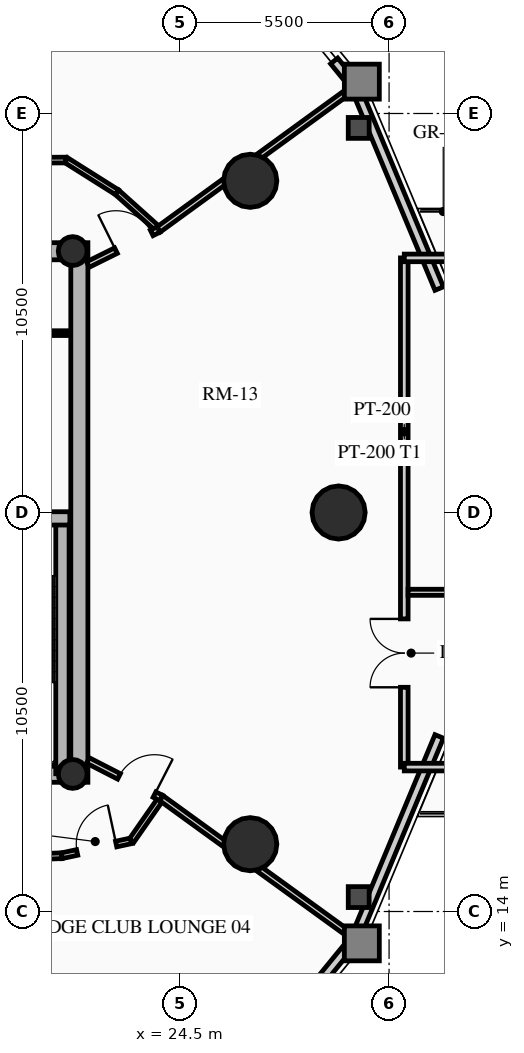
"""IFC4 building model, lengths in metres.
Left out: names, types, materials, properties, quantities, classifications, styles, units other than length and angle.
Written with IfcOpenShell. Run it as: python <this file> out.ifc"""

import sys

from ifc_helpers import new_model, si_unit, direction, frame, frame_2d, origin, origin_2d, place, context, subcontext, project, spatial, rectangle, circle, hollow_circle, extrude, source, transform, mapped, element, fill, save


model = new_model("IFC4")
c1 = context("Model", 3, precision=1e-05, world=origin(), true_north=direction((0.0, 1.0)))
c2 = subcontext(c1, "Body", "Model", "MODEL_VIEW")
j1 = project(units=[si_unit("LENGTHUNIT", "METRE"), si_unit("PLANEANGLEUNIT", "RADIAN")], contexts=[c1])
p1 = place(None, origin())
s1 = spatial("IfcSite", under=j1, at=p1, CompositionType="ELEMENT")
p2 = place(p1, origin())
s2 = spatial("IfcBuilding", under=s1, at=p2, CompositionType="ELEMENT")
p3 = place(p2, frame((0.0, 0.0, 140.32)))
s3 = spatial("IfcBuildingStorey", under=s2, at=p3, CompositionType="ELEMENT", Elevation=140.32)
p4 = place(p3, frame((21.85, 17.4, 0.0), z_axis=(0.0, 0.0, 1.0), x_axis=(0.0, 1.0, 0.0)))
e1 = element("IfcWall", 1, at=p4, inside=s3, PredefinedType="SHEAR", context=c2, shape_type="SweptSolid", body=[
    extrude(rectangle(XDim=14.2, YDim=0.45, at=frame_2d((7.1, 0.0))), origin(), (0.0, 0.0, 1.0), 3.72),
])
p5 = place(p3, frame((11.15, 17.625, 0.0), z_axis=(0.0, 0.0, 1.0), x_axis=(1.0, 0.0, 0.0)))
e2 = element("IfcWall", 2, at=p5, inside=s3, PredefinedType="SHEAR", context=c2, shape_type="SweptSolid", body=[
    extrude(rectangle(XDim=10.7, YDim=0.45, at=frame_2d((5.35, 0.0))), origin(), (0.0, 0.0, 1.0), 3.72),
])
m1 = source(origin(), c2, "Body", "SweptSolid", [
    extrude(rectangle(XDim=1.5, YDim=2.02, at=frame_2d((0.75, 1.01))), frame((0.0, 0.235, 0.0), z_axis=(0.0, -1.0, 0.0), x_axis=(1.0, 0.0, 0.0)), (0.0, 0.0, 1.0), 0.47),
])
p6 = place(p5, frame((5.45, 0.0, 0.0)))
e3 = element("IfcOpeningElement", 3, at=p6, cuts=e2, PredefinedType="OPENING", context=c2, shape_type="MappedRepresentation", body=[
    mapped(m1, transform((0.0, 0.0, 0.0), x_axis=(1.0, 0.0, 0.0), y_axis=(0.0, 1.0, 0.0), z_axis=(0.0, 0.0, 1.0), scale=1.0)),
])
p7 = place(p3, frame((11.15, 31.375, 0.0), z_axis=(0.0, 0.0, 1.0), x_axis=(1.0, 0.0, 0.0)))
e4 = element("IfcWall", 4, at=p7, inside=s3, PredefinedType="SHEAR", context=c2, shape_type="SweptSolid", body=[
    extrude(rectangle(XDim=10.7, YDim=0.45, at=frame_2d((5.35, 0.0))), origin(), (0.0, 0.0, 1.0), 3.72),
])
p8 = place(p7, frame((4.6, 0.0, 0.0)))
e5 = element("IfcOpeningElement", 5, at=p8, cuts=e4, PredefinedType="OPENING", context=c2, shape_type="MappedRepresentation", body=[
    mapped(m1, transform((0.0, 0.0, 0.0), x_axis=(1.0, 0.0, 0.0), y_axis=(0.0, 1.0, 0.0), z_axis=(0.0, 0.0, 1.0), scale=1.0)),
])
p9 = place(p3, frame((21.405, 17.625, 0.0), z_axis=(0.0, 0.0, 1.0), x_axis=(0.0, 1.0, 0.0)))
e6 = element("IfcWall", 6, at=p9, inside=s3, PredefinedType="SHEAR", context=c2, shape_type="SweptSolid", body=[
    extrude(rectangle(XDim=6.72, YDim=0.35, at=frame_2d((3.36, 0.0))), origin(), (0.0, 0.0, 1.0), 3.72),
])
p10 = place(p3, frame((18.315, 24.345, 0.0), z_axis=(0.0, 0.0, 1.0), x_axis=(1.0, 0.0, 0.0)))
e7 = element("IfcWall", 7, at=p10, inside=s3, PredefinedType="SHEAR", context=c2, shape_type="SweptSolid", body=[
    extrude(rectangle(XDim=3.285, YDim=0.35, at=frame_2d((1.643, 0.0))), origin(), (0.0, 0.0, 1.0), 3.72),
])
for number, where, z_axis, x_axis in (
    (8, (21.675, 17.62, 0.0), (0.0, 0.0, 1.0), (1.0, 0.0, 0.0)),
    (9, (21.675, 31.38, 0.0), (0.0, 0.0, 1.0), (1.0, 0.0, 0.0)),
):
    element("IfcColumn", number, at=place(p3, frame(where, z_axis=z_axis, x_axis=x_axis)), inside=s3, PredefinedType="COLUMN", context=c2, shape_type="SweptSolid", body=[
        extrude(hollow_circle(Radius=0.38, WallThickness=0.032, at=origin_2d()), origin(), (0.0, 0.0, 1.0), 3.72),
    ])
for number, where, z_axis, x_axis in (
    (10, (28.672, 24.5, 0.0), (0.0, 0.0, 1.0), (1.0, 0.0, 0.0)),
    (11, (26.347, 33.229, 0.0), (0.0, 0.0, 1.0), (1.0, 0.0, 0.0)),
    (12, (26.347, 15.771, 0.0), (0.0, 0.0, 1.0), (1.0, 0.0, 0.0)),
):
    element("IfcColumn", number, at=place(p3, frame(where, z_axis=z_axis, x_axis=x_axis)), inside=s3, PredefinedType="USERDEFINED", context=c2, shape_type="SweptSolid", body=[
        extrude(circle(Radius=0.7, at=origin_2d()), origin(), (0.0, 0.0, 1.0), 3.72),
    ])
p11 = place(p3, frame((29.105, 35.709, 0.0), z_axis=(0.0, 0.0, 1.0), x_axis=(0.384344417632, -0.923189779317, 0.0)))
e13 = element("IfcWall", 13, at=p11, inside=s3, PredefinedType="SOLIDWALL", context=c2, shape_type="SweptSolid", body=[
    extrude(rectangle(XDim=5.758, YDim=0.24, at=frame_2d((2.879, 0.0))), origin(), (0.0, 0.0, 1.0), 3.465),
])
p12 = place(p3, frame((28.555, 36.383, 0.0), z_axis=(0.0, 0.0, 1.0), x_axis=(0.632702874536, -0.774394649099, 0.0)))
e14 = element("IfcWall", 14, at=p12, inside=s3, PredefinedType="SOLIDWALL", context=c2, shape_type="SweptSolid", body=[
    extrude(rectangle(XDim=0.87, YDim=0.24, at=frame_2d((0.435, 0.0))), origin(), (0.0, 0.0, 1.0), 3.465),
])
p13 = place(p3, frame((29.105, 13.291, 0.0), z_axis=(0.0, 0.0, 1.0), x_axis=(-0.632700781152, -0.77439635945, 0.0)))
e15 = element("IfcWall", 15, at=p13, inside=s3, PredefinedType="SOLIDWALL", context=c2, shape_type="SweptSolid", body=[
    extrude(rectangle(XDim=5.448, YDim=0.24, at=frame_2d((2.724, 0.0))), origin(), (0.0, 0.0, 1.0), 3.465),
])
m2 = source(origin(), c2, "Body", "SweptSolid", [
    extrude(rectangle(XDim=1.9, YDim=1.35, at=frame_2d((0.95, 0.675))), frame((0.0, 0.13, 0.0), z_axis=(0.0, -1.0, 0.0), x_axis=(1.0, 0.0, 0.0)), (0.0, 0.0, 1.0), 0.26),
])
p14 = place(p13, frame((1.774, 0.0, 0.65)))
e16 = element("IfcOpeningElement", 16, at=p14, cuts=e15, PredefinedType="OPENING", context=c2, shape_type="MappedRepresentation", body=[
    mapped(m2, transform((0.0, 0.0, 0.0), x_axis=(1.0, 0.0, 0.0), y_axis=(0.0, 1.0, 0.0), z_axis=(0.0, 0.0, 1.0), scale=1.0)),
])
p15 = place(p3, frame((31.318, 18.607, 0.0), z_axis=(0.0, 0.0, 1.0), x_axis=(-0.384344417632, -0.923189779317, 0.0)))
e17 = element("IfcWall", 17, at=p15, inside=s3, PredefinedType="SOLIDWALL", context=c2, shape_type="SweptSolid", body=[
    extrude(rectangle(XDim=5.758, YDim=0.24, at=frame_2d((2.879, 0.0))), origin(), (0.0, 0.0, 1.0), 3.465),
])
p16 = place(p3, frame((30.4, 17.8, 0.0), z_axis=(0.0, 0.0, 1.0), x_axis=(0.0, 1.0, 0.0)))
e18 = element("IfcWall", 18, at=p16, inside=s3, PredefinedType="PARTITIONING", context=c2, shape_type="SweptSolid", body=[
    extrude(rectangle(XDim=13.4, YDim=0.2, at=frame_2d((6.7, 0.0))), origin(), (0.0, 0.0, 1.0), 2.989),
])
m3 = source(origin(), c2, "Body", "SweptSolid", [
    extrude(rectangle(XDim=1.8, YDim=2.05, at=frame_2d((0.9, 1.025))), frame((0.0, 0.11, 0.0), z_axis=(0.0, -1.0, 0.0), x_axis=(1.0, 0.0, 0.0)), (0.0, 0.0, 1.0), 0.22),
])
p17 = place(p16, frame((2.1, 0.0, 0.0)))
e19 = element("IfcOpeningElement", 19, at=p17, cuts=e18, PredefinedType="OPENING", context=c2, shape_type="MappedRepresentation", body=[
    mapped(m3, transform((0.0, 0.0, 0.0), x_axis=(1.0, 0.0, 0.0), y_axis=(0.0, 1.0, 0.0), z_axis=(0.0, 0.0, 1.0), scale=1.0)),
])
for number, where, z_axis, x_axis in (
    (20, (30.4, 31.2, 0.0), (0.0, 0.0, 1.0), (1.0, 0.0, 0.0)),
    (21, (30.4, 17.8, 0.0), (0.0, 0.0, 1.0), (1.0, 0.0, 0.0)),
):
    element("IfcWall", number, at=place(p3, frame(where, z_axis=z_axis, x_axis=x_axis)), inside=s3, PredefinedType="PARTITIONING", context=c2, shape_type="SweptSolid", body=[
        extrude(rectangle(XDim=1.95, YDim=0.2, at=frame_2d((0.975, 0.0))), origin(), (0.0, 0.0, 1.0), 3.465),
    ])
p18 = place(p3, frame((30.5, 22.4, 0.0), z_axis=(0.0, 0.0, 1.0), x_axis=(1.0, 0.0, 0.0)))
e22 = element("IfcWall", 22, at=p18, inside=s3, PredefinedType="PARTITIONING", context=c2, shape_type="SweptSolid", body=[
    extrude(rectangle(XDim=11.35, YDim=0.16, at=frame_2d((5.675, 0.0))), origin(), (0.0, 0.0, 1.0), 2.742),
])
m4 = source(origin(), c2, "Body", "SweptSolid", [
    extrude(rectangle(XDim=1.5, YDim=2.02, at=frame_2d((0.75, 1.01))), frame((0.0, 0.09, 0.0), z_axis=(0.0, -1.0, 0.0), x_axis=(1.0, 0.0, 0.0)), (0.0, 0.0, 1.0), 0.18),
])
p19 = place(p18, frame((4.9, 0.0, 0.0)))
e23 = element("IfcOpeningElement", 23, at=p19, cuts=e22, PredefinedType="OPENING", context=c2, shape_type="MappedRepresentation", body=[
    mapped(m4, transform((0.0, 0.0, 0.0), x_axis=(1.0, 0.0, 0.0), y_axis=(0.0, 1.0, 0.0), z_axis=(0.0, 0.0, 1.0), scale=1.0)),
])
p20 = place(p3, frame((18.38, 29.22, 0.0), z_axis=(0.0, 0.0, 1.0), x_axis=(1.0, 0.0, 0.0)))
e24 = element("IfcWall", 24, at=p20, inside=s3, PredefinedType="PARTITIONING", context=c2, shape_type="SweptSolid", body=[
    extrude(rectangle(XDim=3.22, YDim=0.125, at=frame_2d((1.61, 0.0))), origin(), (0.0, 0.0, 1.0), 3.002),
])
p21 = place(p3, frame((23.933, 31.946, 0.0), z_axis=(0.0, 0.0, 1.0), x_axis=(-0.744529651383, 0.667589393423, 0.0)))
e25 = element("IfcWall", 25, at=p21, inside=s3, PredefinedType="PARTITIONING", context=c2, shape_type="SweptSolid", body=[
    extrude(rectangle(XDim=1.472, YDim=0.15, at=frame_2d((0.736, 0.0))), origin(), (0.0, 0.0, 1.0), 3.035),
])
p22 = place(p3, frame((22.837, 32.929, 0.0), z_axis=(0.0, 0.0, 1.0), x_axis=(-0.84581079329, 0.533482991252, 0.0)))
e26 = element("IfcWall", 26, at=p22, inside=s3, PredefinedType="PARTITIONING", context=c2, shape_type="SweptSolid", body=[
    extrude(rectangle(XDim=1.585, YDim=0.15, at=frame_2d((0.792, 0.0))), origin(), (0.0, 0.0, 1.0), 3.035),
])
p23 = place(p3, frame((21.496, 33.775, 0.0), z_axis=(0.0, 0.0, 1.0), x_axis=(-0.999989544737, -0.004572790979, 0.0)))
e27 = element("IfcWall", 27, at=p23, inside=s3, PredefinedType="PARTITIONING", context=c2, shape_type="SweptSolid", body=[
    extrude(rectangle(XDim=3.364, YDim=0.15, at=frame_2d((1.682, 0.0))), origin(), (0.0, 0.0, 1.0), 3.035),
])
m5 = source(origin(), c2, "Body", "SweptSolid", [
    extrude(rectangle(XDim=1.05, YDim=2.015, at=frame_2d((0.525, 1.007))), frame((0.0, 0.085, 0.0), z_axis=(0.0, -1.0, 0.0), x_axis=(1.0, 0.0, 0.0)), (0.0, 0.0, 1.0), 0.17),
])
p24 = place(p23, frame((1.546, 0.0, 0.0)))
e28 = element("IfcOpeningElement", 28, at=p24, cuts=e27, PredefinedType="OPENING", context=c2, shape_type="MappedRepresentation", body=[
    mapped(m5, transform((0.0, 0.0, 0.0), x_axis=(1.0, 0.0, 0.0), y_axis=(0.0, 1.0, 0.0), z_axis=(0.0, 0.0, 1.0), scale=1.0)),
])
p25 = place(p3, frame((14.792, 15.24, 0.0), z_axis=(0.0, 0.0, 1.0), x_axis=(0.999408106202, 0.034401122909, 0.0)))
e29 = element("IfcWall", 29, at=p25, inside=s3, PredefinedType="PARTITIONING", context=c2, shape_type="SweptSolid", body=[
    extrude(rectangle(XDim=6.6, YDim=0.15, at=frame_2d((3.3, 0.0))), origin(), (0.0, 0.0, 1.0), 3.035),
])
p26 = place(p3, frame((21.388, 15.468, 0.0), z_axis=(0.0, 0.0, 1.0), x_axis=(0.977672748596, 0.210133283069, 0.0)))
e30 = element("IfcWall", 30, at=p26, inside=s3, PredefinedType="PARTITIONING", context=c2, shape_type="SweptSolid", body=[
    extrude(rectangle(XDim=1.876, YDim=0.15, at=frame_2d((0.938, 0.0))), origin(), (0.0, 0.0, 1.0), 3.035),
])
p27 = place(p26, frame((0.413, 0.0, 0.0)))
e31 = element("IfcOpeningElement", 31, at=p27, cuts=e30, PredefinedType="OPENING", context=c2, shape_type="MappedRepresentation", body=[
    mapped(m5, transform((0.0, 0.0, 0.0), x_axis=(1.0, 0.0, 0.0), y_axis=(0.0, 1.0, 0.0), z_axis=(0.0, 0.0, 1.0), scale=1.0)),
])
p28 = place(p3, frame((23.222, 15.862, 0.0), z_axis=(0.0, 0.0, 1.0), x_axis=(0.571941738195, 0.820294244836, 0.0)))
e32 = element("IfcWall", 32, at=p28, inside=s3, PredefinedType="PARTITIONING", context=c2, shape_type="SweptSolid", body=[
    extrude(rectangle(XDim=1.369, YDim=0.15, at=frame_2d((0.685, 0.0))), origin(), (0.0, 0.0, 1.0), 3.035),
])
p29 = place(p3, frame((23.933, 31.946, 0.0), z_axis=(0.0, 0.0, 1.0), x_axis=(0.808636722237, 0.588308296261, 0.0)))
e33 = element("IfcWall", 33, at=p29, inside=s3, PredefinedType="PARTITIONING", context=c2, shape_type="SweptSolid", body=[
    extrude(rectangle(XDim=6.376, YDim=0.16, at=frame_2d((3.188, 0.0))), origin(), (0.0, 0.0, 1.0), 2.989),
])
p30 = place(p3, frame((24.006, 16.985, 0.0), z_axis=(0.0, 0.0, 1.0), x_axis=(0.809849730791, -0.586637378231, 0.0)))
e34 = element("IfcWall", 34, at=p30, inside=s3, PredefinedType="PARTITIONING", context=c2, shape_type="SweptSolid", body=[
    extrude(rectangle(XDim=6.277, YDim=0.16, at=frame_2d((3.139, 0.0))), origin(), (0.0, 0.0, 1.0), 2.989),
])
p31 = place(p3, frame((22.075, 31.025, 0.0), z_axis=(0.0, 0.0, 1.0), x_axis=(0.8959286695, 0.444197950432, 0.0)))
e35 = element("IfcWall", 35, at=p31, inside=s3, PredefinedType="PARTITIONING", context=c2, shape_type="SweptSolid", body=[
    extrude(rectangle(XDim=2.074, YDim=0.16, at=frame_2d((1.037, 0.0))), origin(), (0.0, 0.0, 1.0), 3.035),
])
m6 = source(origin(), c2, "Body", "SweptSolid", [
    extrude(rectangle(XDim=1.05, YDim=2.015, at=frame_2d((0.525, 1.007))), frame((0.0, 0.09, 0.0), z_axis=(0.0, -1.0, 0.0), x_axis=(1.0, 0.0, 0.0)), (0.0, 0.0, 1.0), 0.18),
])
p32 = place(p31, frame((0.824, 0.0, 0.0)))
e36 = element("IfcOpeningElement", 36, at=p32, cuts=e35, PredefinedType="OPENING", context=c2, shape_type="MappedRepresentation", body=[
    mapped(m6, transform((0.0, 0.0, 0.0), x_axis=(1.0, 0.0, 0.0), y_axis=(0.0, 1.0, 0.0), z_axis=(0.0, 0.0, 1.0), scale=1.0)),
])
p33 = place(p3, frame((22.075, 17.975, 0.0), z_axis=(0.0, 0.0, 1.0), x_axis=(0.889835034782, -0.456282380632, 0.0)))
e37 = element("IfcWall", 37, at=p33, inside=s3, PredefinedType="PARTITIONING", context=c2, shape_type="SweptSolid", body=[
    extrude(rectangle(XDim=2.17, YDim=0.16, at=frame_2d((1.085, 0.0))), origin(), (0.0, 0.0, 1.0), 3.035),
])
p34 = place(p33, frame((0.92, 0.0, 0.0)))
e38 = element("IfcOpeningElement", 38, at=p34, cuts=e37, PredefinedType="OPENING", context=c2, shape_type="MappedRepresentation", body=[
    mapped(m6, transform((0.0, 0.0, 0.0), x_axis=(1.0, 0.0, 0.0), y_axis=(0.0, 1.0, 0.0), z_axis=(0.0, 0.0, 1.0), scale=1.0)),
])
m7 = source(origin(), c2, "Body", "SweptSolid", [
    extrude(rectangle(XDim=1.8, YDim=2.05, at=frame_2d((0.9, 1.025))), frame((0.0, 0.025, 0.0), z_axis=(0.0, -1.0, 0.0), x_axis=(1.0, 0.0, 0.0)), (0.0, 0.0, 1.0), 0.05),
])
p35 = place(p17, origin())
e39 = element("IfcDoor", 39, at=p35, inside=s3, OperationType="DOUBLE_DOOR_SINGLE_SWING", PredefinedType="DOOR", context=c2, shape_type="MappedRepresentation", body=[
    mapped(m7, transform((0.0, 0.0, 0.0), x_axis=(1.0, 0.0, 0.0), y_axis=(0.0, 1.0, 0.0), z_axis=(0.0, 0.0, 1.0), scale=1.0)),
])
fill(e19, e39)
m8 = source(origin(), c2, "Body", "SweptSolid", [
    extrude(rectangle(XDim=1.05, YDim=2.015, at=frame_2d((0.525, 1.007))), frame((0.0, 0.025, 0.0), z_axis=(0.0, -1.0, 0.0), x_axis=(1.0, 0.0, 0.0)), (0.0, 0.0, 1.0), 0.05),
])
p36 = place(p32, origin())
e40 = element("IfcDoor", 40, at=p36, inside=s3, OperationType="SINGLE_SWING_LEFT", PredefinedType="DOOR", context=c2, shape_type="MappedRepresentation", body=[
    mapped(m8, transform((0.0, 0.0, 0.0), x_axis=(1.0, 0.0, 0.0), y_axis=(0.0, 1.0, 0.0), z_axis=(0.0, 0.0, 1.0), scale=1.0)),
])
fill(e36, e40)
p37 = place(p34, origin())
e41 = element("IfcDoor", 41, at=p37, inside=s3, OperationType="SINGLE_SWING_RIGHT", PredefinedType="DOOR", context=c2, shape_type="MappedRepresentation", body=[
    mapped(m8, transform((0.0, 0.0, 0.0), x_axis=(1.0, 0.0, 0.0), y_axis=(0.0, 1.0, 0.0), z_axis=(0.0, 0.0, 1.0), scale=1.0)),
])
fill(e38, e41)
p38 = place(p27, origin())
e42 = element("IfcDoor", 42, at=p38, inside=s3, OperationType="SINGLE_SWING_RIGHT", PredefinedType="DOOR", context=c2, shape_type="MappedRepresentation", body=[
    mapped(m8, transform((0.0, 0.0, 0.0), x_axis=(1.0, 0.0, 0.0), y_axis=(0.0, 1.0, 0.0), z_axis=(0.0, 0.0, 1.0), scale=1.0)),
])
fill(e31, e42)
save(model, sys.argv[1])
